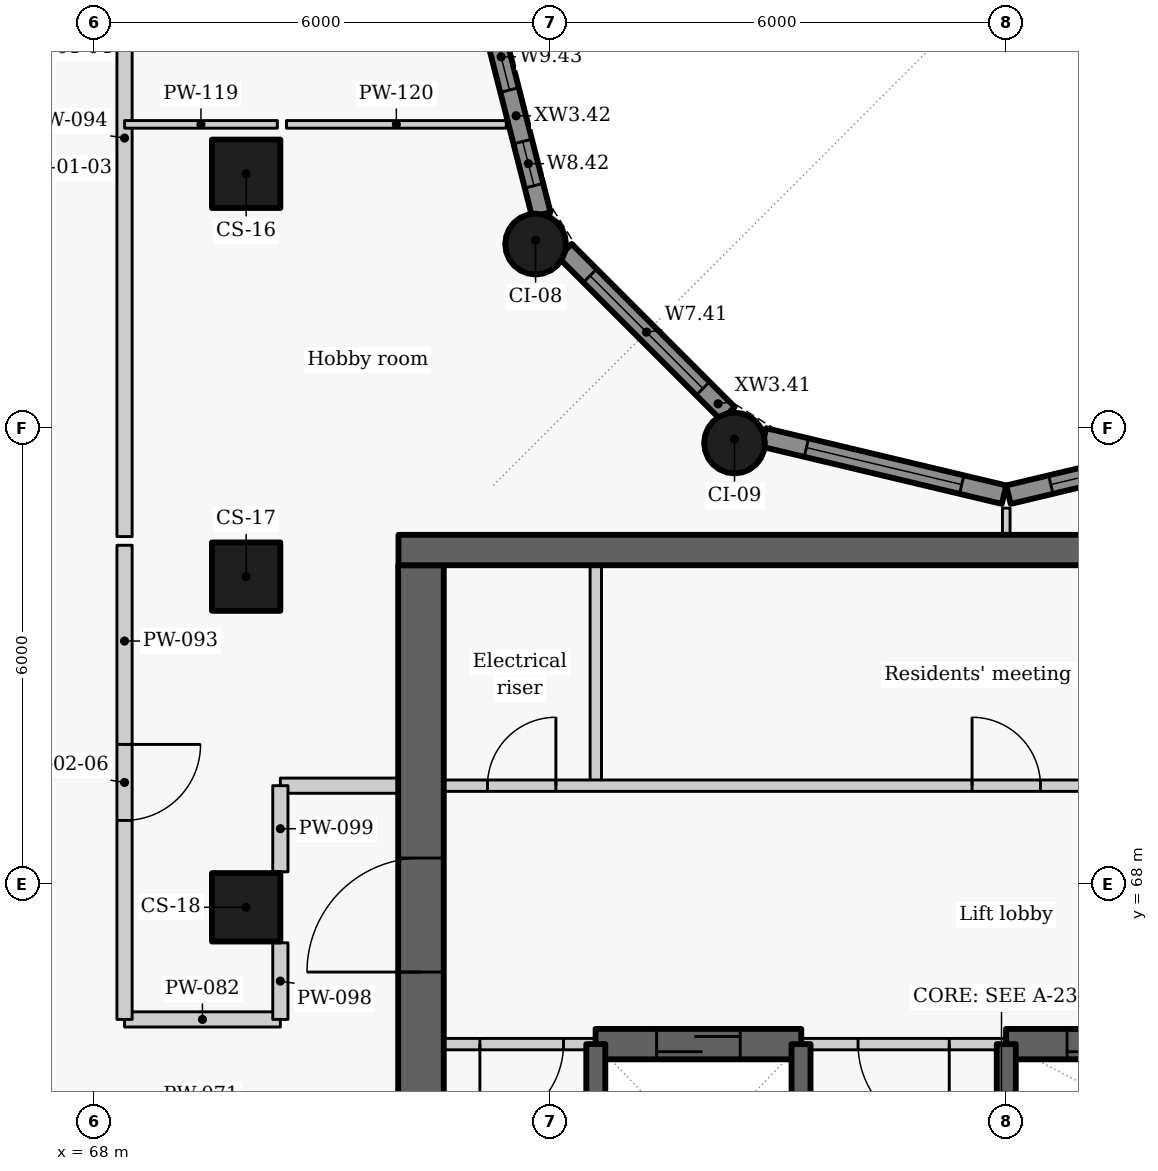
"""IFC4 building model, lengths in metres.
Left out: names, types, materials, properties, quantities, classifications, styles, units other than length and angle.
Written with IfcOpenShell. Run it as: python <this file> out.ifc"""

import sys

from ifc_helpers import new_model, si_unit, direction, frame, frame_2d, origin, origin_2d, place, context, subcontext, project, spatial, rectangle, circle, extrude, element, fill, save


model = new_model("IFC4")
c1 = context("Model", 3, precision=1e-05, world=origin(), true_north=direction((0.0, 1.0)))
c2 = subcontext(c1, "Body", "Model", "MODEL_VIEW")
j1 = project(units=[si_unit("LENGTHUNIT", "METRE"), si_unit("PLANEANGLEUNIT", "RADIAN")], contexts=[c1])
p1 = place(None, origin())
s1 = spatial("IfcSite", under=j1, at=p1, CompositionType="ELEMENT")
p2 = place(p1, origin())
s2 = spatial("IfcBuilding", under=s1, at=p2, CompositionType="ELEMENT")
p3 = place(p2, frame((0.0, 0.0, 213.0)))
s3 = spatial("IfcBuildingStorey", under=s2, at=p3, CompositionType="ELEMENT", Elevation=213.0)
for number, where, z_axis, x_axis in (
    (1, (70.0, 77.35, 0.0), (0.0, 0.0, 1.0), (0.0, -1.0, 0.0)),
    (2, (70.0, 72.05, 0.0), (0.0, 0.0, 1.0), (0.0, -1.0, 0.0)),
    (3, (70.0, 67.7, 0.0), (0.0, 0.0, 1.0), (0.0, -1.0, 0.0)),
):
    element("IfcColumn", number, at=place(p3, frame(where, z_axis=z_axis, x_axis=x_axis)), inside=s3, PredefinedType="COLUMN", context=c2, shape_type="SweptSolid", body=[
        extrude(rectangle(XDim=0.9, YDim=0.9, at=origin_2d()), origin(), (0.0, 0.0, 1.0), 3.3),
    ])
for number, where, z_axis, x_axis in (
    (4, (73.808, 76.425, 0.0), (0.0, 0.0, 1.0), (0.5, -0.866, 0.0)),
    (5, (76.425, 73.808, 0.0), (0.0, 0.0, 1.0), (0.866, -0.5, 0.0)),
):
    element("IfcColumn", number, at=place(p3, frame(where, z_axis=z_axis, x_axis=x_axis)), inside=s3, PredefinedType="COLUMN", context=c2, shape_type="SweptSolid", body=[
        extrude(circle(Radius=0.4, at=origin_2d()), origin(), (0.0, 0.0, 1.0), 3.3),
    ])
p4 = place(p3, frame((83.186, 73.881, 0.0), z_axis=(0.0, 0.0, 1.0), x_axis=(-0.972773113459, -0.231759508395, 0.0)))
e6 = element("IfcWall", 6, at=p4, inside=s3, PredefinedType="SOLIDWALL", context=c2, shape_type="SweptSolid", body=[
    extrude(rectangle(XDim=3.246, YDim=0.25, at=frame_2d((1.623, 0.0))), origin(), (0.0, 0.0, 1.0), 2.425),
])
p5 = place(p4, frame((0.573, 0.0, 0.9)))
e7 = element("IfcOpeningElement", 7, at=p5, cuts=e6, PredefinedType="OPENING", context=c2, shape_type="SweptSolid", body=[
    extrude(rectangle(XDim=2.1, YDim=1.1, at=frame_2d((1.05, 0.55))), frame((0.0, 0.135, 0.0), z_axis=(0.0, -1.0, 0.0), x_axis=(1.0, 0.0, 0.0)), (0.0, 0.0, 1.0), 0.27),
])
p6 = place(p3, frame((79.971, 73.128, 0.0), z_axis=(0.0, 0.0, 1.0), x_axis=(-0.972773113459, 0.231759508395, 0.0)))
e8 = element("IfcWall", 8, at=p6, inside=s3, PredefinedType="SOLIDWALL", context=c2, shape_type="SweptSolid", body=[
    extrude(rectangle(XDim=3.246, YDim=0.25, at=frame_2d((1.623, 0.0))), origin(), (0.0, 0.0, 1.0), 2.425),
])
p7 = place(p6, frame((0.573, 0.0, 0.9)))
e9 = element("IfcOpeningElement", 9, at=p7, cuts=e8, PredefinedType="OPENING", context=c2, shape_type="SweptSolid", body=[
    extrude(rectangle(XDim=2.1, YDim=1.1, at=frame_2d((1.05, 0.55))), frame((0.0, 0.135, 0.0), z_axis=(0.0, -1.0, 0.0), x_axis=(1.0, 0.0, 0.0)), (0.0, 0.0, 1.0), 0.27),
])
p8 = place(p3, frame((76.339, 74.194, 0.0), z_axis=(0.0, 0.0, 1.0), x_axis=(-0.707106781187, 0.707106781187, 0.0)))
e10 = element("IfcWall", 10, at=p8, inside=s3, PredefinedType="SOLIDWALL", context=c2, shape_type="SweptSolid", body=[
    extrude(rectangle(XDim=3.033, YDim=0.25, at=frame_2d((1.517, 0.0))), origin(), (0.0, 0.0, 1.0), 2.425),
])
p9 = place(p8, frame((0.467, 0.0, 0.9)))
e11 = element("IfcOpeningElement", 11, at=p9, cuts=e10, PredefinedType="OPENING", context=c2, shape_type="SweptSolid", body=[
    extrude(rectangle(XDim=2.1, YDim=1.1, at=frame_2d((1.05, 0.55))), frame((0.0, 0.135, 0.0), z_axis=(0.0, -1.0, 0.0), x_axis=(1.0, 0.0, 0.0)), (0.0, 0.0, 1.0), 0.27),
])
p10 = place(p3, frame((73.883, 76.813, 0.0), z_axis=(0.0, 0.0, 1.0), x_axis=(-0.247055971283, 0.969001211069, 0.0)))
e12 = element("IfcWall", 12, at=p10, inside=s3, PredefinedType="SOLIDWALL", context=c2, shape_type="SweptSolid", body=[
    extrude(rectangle(XDim=3.01, YDim=0.25, at=frame_2d((1.505, 0.0))), origin(), (0.0, 0.0, 1.0), 2.425),
])
p11 = place(p10, frame((0.392, 0.0, 0.9)))
e13 = element("IfcOpeningElement", 13, at=p11, cuts=e12, PredefinedType="OPENING", context=c2, shape_type="SweptSolid", body=[
    extrude(rectangle(XDim=0.6, YDim=1.1, at=frame_2d((0.3, 0.55))), frame((0.0, 0.135, 0.0), z_axis=(0.0, -1.0, 0.0), x_axis=(1.0, 0.0, 0.0)), (0.0, 0.0, 1.0), 0.27),
])
p12 = place(p10, frame((1.691, 0.0, 0.9)))
e14 = element("IfcOpeningElement", 14, at=p12, cuts=e12, PredefinedType="OPENING", context=c2, shape_type="SweptSolid", body=[
    extrude(rectangle(XDim=0.9, YDim=1.1, at=frame_2d((0.45, 0.55))), frame((0.0, 0.135, 0.0), z_axis=(0.0, -1.0, 0.0), x_axis=(1.0, 0.0, 0.0)), (0.0, 0.0, 1.0), 0.27),
])
p13 = place(p3, frame((74.6, 69.3, 0.0), z_axis=(0.0, 0.0, 1.0), x_axis=(0.0, 1.0, 0.0)))
e15 = element("IfcWall", 15, at=p13, inside=s3, PredefinedType="PARTITIONING", context=c2, shape_type="SweptSolid", body=[
    extrude(rectangle(XDim=2.9, YDim=0.15, at=frame_2d((1.45, 0.0))), origin(), (0.0, 0.0, 1.0), 3.025),
])
p14 = place(p3, frame((72.0, 69.3, 0.0), z_axis=(0.0, 0.0, 1.0), x_axis=(1.0, 0.0, 0.0)))
e16 = element("IfcWall", 16, at=p14, inside=s3, PredefinedType="PARTITIONING", context=c2, shape_type="SweptSolid", body=[
    extrude(rectangle(XDim=13.4, YDim=0.15, at=frame_2d((6.7, 0.0))), origin(), (0.0, 0.0, 1.0), 3.025),
])
p15 = place(p14, frame((1.175, 0.0, 0.0)))
e17 = element("IfcOpeningElement", 17, at=p15, cuts=e16, PredefinedType="OPENING", context=c2, shape_type="SweptSolid", body=[
    extrude(rectangle(XDim=0.9, YDim=2.1, at=frame_2d((0.45, 1.05))), frame((0.0, 0.085, 0.0), z_axis=(0.0, -1.0, 0.0), x_axis=(1.0, 0.0, 0.0)), (0.0, 0.0, 1.0), 0.17),
])
p16 = place(p14, frame((7.55, 0.0, 0.0)))
e18 = element("IfcOpeningElement", 18, at=p16, cuts=e16, PredefinedType="OPENING", context=c2, shape_type="SweptSolid", body=[
    extrude(rectangle(XDim=0.9, YDim=2.1, at=frame_2d((0.45, 1.05))), frame((0.0, 0.085, 0.0), z_axis=(0.0, -1.0, 0.0), x_axis=(1.0, 0.0, 0.0)), (0.0, 0.0, 1.0), 0.17),
])
p17 = place(p3, frame((72.3, 63.1, -0.275), z_axis=(0.0, 0.0, 1.0), x_axis=(0.0, 1.0, 0.0)))
e19 = element("IfcWall", 19, at=p17, inside=s3, PredefinedType="SHEAR", context=c2, shape_type="SweptSolid", body=[
    extrude(rectangle(XDim=9.1, YDim=0.6, at=frame_2d((4.55, 0.0))), origin(), (0.0, 0.0, 1.0), 3.3),
])
p18 = place(p17, frame((3.748, 0.0, 0.275)))
e20 = element("IfcOpeningElement", 20, at=p18, cuts=e19, PredefinedType="OPENING", context=c2, shape_type="SweptSolid", body=[
    extrude(rectangle(XDim=1.5, YDim=2.1, at=frame_2d((0.75, 1.05))), frame((0.0, 0.31, 0.0), z_axis=(0.0, -1.0, 0.0), x_axis=(1.0, 0.0, 0.0)), (0.0, 0.0, 1.0), 0.62),
])
p19 = place(p3, frame((74.603, 65.9, 0.0), z_axis=(0.0, 0.0, 1.0), x_axis=(-1.0, 0.0, 0.0)))
e21 = element("IfcWall", 21, at=p19, inside=s3, PredefinedType="PARTITIONING", context=c2, shape_type="SweptSolid", body=[
    extrude(rectangle(XDim=2.603, YDim=0.15, at=frame_2d((1.302, 0.0))), origin(), (0.0, 0.0, 1.0), 3.025),
])
p20 = place(p19, frame((0.428, 0.0, 0.0)))
e22 = element("IfcOpeningElement", 22, at=p20, cuts=e21, PredefinedType="OPENING", context=c2, shape_type="SweptSolid", body=[
    extrude(rectangle(XDim=1.1, YDim=2.1, at=frame_2d((0.55, 1.05))), frame((0.0, 0.085, 0.0), z_axis=(0.0, -1.0, 0.0), x_axis=(1.0, 0.0, 0.0)), (0.0, 0.0, 1.0), 0.17),
])
p21 = place(p3, frame((80.003, 65.9, 0.0), z_axis=(0.0, 0.0, 1.0), x_axis=(-1.0, 0.0, 0.0)))
e23 = element("IfcWall", 23, at=p21, inside=s3, PredefinedType="PARTITIONING", context=c2, shape_type="SweptSolid", body=[
    extrude(rectangle(XDim=2.706, YDim=0.15, at=frame_2d((1.353, 0.0))), origin(), (0.0, 0.0, 1.0), 3.025),
])
p22 = place(p21, frame((0.753, 0.0, 0.0)))
e24 = element("IfcOpeningElement", 24, at=p22, cuts=e23, PredefinedType="OPENING", context=c2, shape_type="SweptSolid", body=[
    extrude(rectangle(XDim=1.2, YDim=2.1, at=frame_2d((0.6, 1.05))), frame((0.0, 0.085, 0.0), z_axis=(0.0, -1.0, 0.0), x_axis=(1.0, 0.0, 0.0)), (0.0, 0.0, 1.0), 0.17),
])
p23 = place(p3, frame((74.597, 65.9, -0.275), z_axis=(0.0, 0.0, 1.0), x_axis=(1.0, 0.0, 0.0)))
e25 = element("IfcWall", 25, at=p23, inside=s3, PredefinedType="SHEAR", context=c2, shape_type="SweptSolid", body=[
    extrude(rectangle(XDim=2.706, YDim=0.4, at=frame_2d((1.353, 0.0))), origin(), (0.0, 0.0, 1.0), 3.3),
])
p24 = place(p23, frame((0.803, 0.0, 0.275)))
e26 = element("IfcOpeningElement", 26, at=p24, cuts=e25, PredefinedType="OPENING", context=c2, shape_type="SweptSolid", body=[
    extrude(rectangle(XDim=1.1, YDim=2.1, at=frame_2d((0.55, 1.05))), frame((0.0, 0.21, 0.0), z_axis=(0.0, -1.0, 0.0), x_axis=(1.0, 0.0, 0.0)), (0.0, 0.0, 1.0), 0.42),
])
p25 = place(p3, frame((79.997, 65.9, -0.275), z_axis=(0.0, 0.0, 1.0), x_axis=(1.0, 0.0, 0.0)))
e27 = element("IfcWall", 27, at=p25, inside=s3, PredefinedType="SHEAR", context=c2, shape_type="SweptSolid", body=[
    extrude(rectangle(XDim=5.406, YDim=0.4, at=frame_2d((2.703, 0.0))), origin(), (0.0, 0.0, 1.0), 3.3),
])
p26 = place(p25, frame((0.803, 0.0, 0.275)))
e28 = element("IfcOpeningElement", 28, at=p26, cuts=e27, PredefinedType="OPENING", context=c2, shape_type="SweptSolid", body=[
    extrude(rectangle(XDim=1.1, YDim=2.1, at=frame_2d((0.55, 1.05))), frame((0.0, 0.21, 0.0), z_axis=(0.0, -1.0, 0.0), x_axis=(1.0, 0.0, 0.0)), (0.0, 0.0, 1.0), 0.42),
])
for number, where, z_axis, x_axis in (
    (29, (74.6, 63.1, -0.275), (0.0, 0.0, 1.0), (0.0, 1.0, 0.0)),
    (30, (77.3, 63.1, -0.275), (0.0, 0.0, 1.0), (0.0, 1.0, 0.0)),
    (31, (80.0, 63.1, -0.275), (0.0, 0.0, 1.0), (0.0, 1.0, 0.0)),
):
    element("IfcWall", number, at=place(p3, frame(where, z_axis=z_axis, x_axis=x_axis)), inside=s3, PredefinedType="SHEAR", context=c2, shape_type="SweptSolid", body=[
        extrude(rectangle(XDim=2.8, YDim=0.25, at=frame_2d((1.4, 0.0))), origin(), (0.0, 0.0, 1.0), 3.3),
    ])
p27 = place(p3, frame((70.45, 69.3, 0.0), z_axis=(0.0, 0.0, 1.0), x_axis=(1.0, 0.0, 0.0)))
e32 = element("IfcWall", 32, at=p27, inside=s3, PredefinedType="PARTITIONING", context=c2, shape_type="SweptSolid", body=[
    extrude(rectangle(XDim=1.55, YDim=0.2, at=frame_2d((0.775, 0.0))), origin(), (0.0, 0.0, 1.0), 3.025),
])
p28 = place(p3, frame((68.4, 66.225, 0.0), z_axis=(0.0, 0.0, 1.0), x_axis=(1.0, 0.0, 0.0)))
e33 = element("IfcWall", 33, at=p28, inside=s3, PredefinedType="PARTITIONING", context=c2, shape_type="SweptSolid", body=[
    extrude(rectangle(XDim=2.05, YDim=0.2, at=frame_2d((1.025, 0.0))), origin(), (0.0, 0.0, 1.0), 2.505),
])
p29 = place(p3, frame((68.4, 72.463, 0.0), z_axis=(0.0, 0.0, 1.0), x_axis=(0.0, -1.0, 0.0)))
e34 = element("IfcWall", 34, at=p29, inside=s3, PredefinedType="PARTITIONING", context=c2, shape_type="SweptSolid", body=[
    extrude(rectangle(XDim=6.238, YDim=0.2, at=frame_2d((3.119, 0.0))), origin(), (0.0, 0.0, 1.0), 3.025),
])
p30 = place(p29, frame((2.62, 0.0, 0.0)))
e35 = element("IfcOpeningElement", 35, at=p30, cuts=e34, PredefinedType="OPENING", context=c2, shape_type="SweptSolid", body=[
    extrude(rectangle(XDim=1.0, YDim=2.1, at=frame_2d((0.5, 1.05))), frame((0.0, 0.11, 0.0), z_axis=(0.0, -1.0, 0.0), x_axis=(1.0, 0.0, 0.0)), (0.0, 0.0, 1.0), 0.22),
])
p31 = place(p3, frame((68.4, 72.577, 0.0), z_axis=(0.0, 0.0, 1.0), x_axis=(0.0, 1.0, 0.0)))
e36 = element("IfcWall", 36, at=p31, inside=s3, PredefinedType="PARTITIONING", context=c2, shape_type="SweptSolid", body=[
    extrude(rectangle(XDim=10.486, YDim=0.2, at=frame_2d((5.243, 0.0))), origin(), (0.0, 0.0, 1.0), 3.025),
])
p32 = place(p3, frame((70.45, 66.225, 0.0), z_axis=(0.0, 0.0, 1.0), x_axis=(0.0, 1.0, 0.0)))
e37 = element("IfcWall", 37, at=p32, inside=s3, PredefinedType="PARTITIONING", context=c2, shape_type="SweptSolid", body=[
    extrude(rectangle(XDim=1.008, YDim=0.2, at=frame_2d((0.504, 0.0))), origin(), (0.0, 0.0, 1.0), 3.025),
])
p33 = place(p3, frame((70.45, 68.167, 0.0), z_axis=(0.0, 0.0, 1.0), x_axis=(0.0, 1.0, 0.0)))
e38 = element("IfcWall", 38, at=p33, inside=s3, PredefinedType="PARTITIONING", context=c2, shape_type="SweptSolid", body=[
    extrude(rectangle(XDim=1.133, YDim=0.2, at=frame_2d((0.566, 0.0))), origin(), (0.0, 0.0, 1.0), 3.025),
])
p34 = place(p3, frame((80.0, 72.6, 0.0), z_axis=(0.0, 0.0, 1.0), x_axis=(0.0, 1.0, 0.0)))
e39 = element("IfcWall", 39, at=p34, inside=s3, PredefinedType="PARTITIONING", context=c2, shape_type="SweptSolid", body=[
    extrude(rectangle(XDim=0.352, YDim=0.1, at=frame_2d((0.176, 0.0))), origin(), (0.0, 0.0, 1.0), 3.025),
])
p35 = place(p3, frame((68.401, 78.0, 0.0), z_axis=(0.0, 0.0, 1.0), x_axis=(1.0, 0.0, 0.0)))
e40 = element("IfcWall", 40, at=p35, inside=s3, PredefinedType="PARTITIONING", context=c2, shape_type="SweptSolid", body=[
    extrude(rectangle(XDim=2.009, YDim=0.1, at=frame_2d((1.004, 0.0))), origin(), (0.0, 0.0, 1.0), 2.505),
])
p36 = place(p3, frame((70.53, 78.0, 0.0), z_axis=(0.0, 0.0, 1.0), x_axis=(1.0, 0.0, 0.0)))
e41 = element("IfcWall", 41, at=p36, inside=s3, PredefinedType="PARTITIONING", context=c2, shape_type="SweptSolid", body=[
    extrude(rectangle(XDim=2.892, YDim=0.1, at=frame_2d((1.446, 0.0))), origin(), (0.0, 0.0, 1.0), 3.025),
])
p37 = place(p3, frame((72.004, 72.4, -0.275), z_axis=(0.0, 0.0, 1.0), x_axis=(1.0, 0.0, 0.0)))
e42 = element("IfcWall", 42, at=p37, inside=s3, PredefinedType="SHEAR", context=c2, shape_type="SweptSolid", body=[
    extrude(rectangle(XDim=15.992, YDim=0.4, at=frame_2d((7.996, 0.0))), origin(), (0.0, 0.0, 1.0), 3.3),
])
p38 = place(p5, origin())
e43 = element("IfcWindow", 43, at=p38, inside=s3, PartitioningType="SINGLE_PANEL", PredefinedType="WINDOW", context=c2, shape_type="SweptSolid", body=[
    extrude(rectangle(XDim=2.1, YDim=1.1, at=frame_2d((1.05, 0.55))), frame((0.0, 0.03, 0.0), z_axis=(0.0, -1.0, 0.0), x_axis=(1.0, 0.0, 0.0)), (0.0, 0.0, 1.0), 0.06),
])
fill(e7, e43)
p39 = place(p7, origin())
e44 = element("IfcWindow", 44, at=p39, inside=s3, PartitioningType="SINGLE_PANEL", PredefinedType="WINDOW", context=c2, shape_type="SweptSolid", body=[
    extrude(rectangle(XDim=2.1, YDim=1.1, at=frame_2d((1.05, 0.55))), frame((0.0, 0.03, 0.0), z_axis=(0.0, -1.0, 0.0), x_axis=(1.0, 0.0, 0.0)), (0.0, 0.0, 1.0), 0.06),
])
fill(e9, e44)
p40 = place(p9, origin())
e45 = element("IfcWindow", 45, at=p40, inside=s3, PartitioningType="SINGLE_PANEL", PredefinedType="WINDOW", context=c2, shape_type="SweptSolid", body=[
    extrude(rectangle(XDim=2.1, YDim=1.1, at=frame_2d((1.05, 0.55))), frame((0.0, 0.03, 0.0), z_axis=(0.0, -1.0, 0.0), x_axis=(1.0, 0.0, 0.0)), (0.0, 0.0, 1.0), 0.06),
])
fill(e11, e45)
p41 = place(p11, origin())
e46 = element("IfcWindow", 46, at=p41, inside=s3, PartitioningType="SINGLE_PANEL", PredefinedType="WINDOW", context=c2, shape_type="SweptSolid", body=[
    extrude(rectangle(XDim=0.6, YDim=1.1, at=frame_2d((0.3, 0.55))), frame((0.0, 0.03, 0.0), z_axis=(0.0, -1.0, 0.0), x_axis=(1.0, 0.0, 0.0)), (0.0, 0.0, 1.0), 0.06),
])
fill(e13, e46)
p42 = place(p12, origin())
e47 = element("IfcWindow", 47, at=p42, inside=s3, PartitioningType="SINGLE_PANEL", PredefinedType="WINDOW", context=c2, shape_type="SweptSolid", body=[
    extrude(rectangle(XDim=0.9, YDim=1.1, at=frame_2d((0.45, 0.55))), frame((0.0, 0.03, 0.0), z_axis=(0.0, -1.0, 0.0), x_axis=(1.0, 0.0, 0.0)), (0.0, 0.0, 1.0), 0.06),
])
fill(e14, e47)
p43 = place(p15, origin())
e48 = element("IfcDoor", 48, at=p43, inside=s3, OperationType="SINGLE_SWING_RIGHT", PredefinedType="DOOR", context=c2, shape_type="SweptSolid", body=[
    extrude(rectangle(XDim=0.9, YDim=2.1, at=frame_2d((0.45, 1.05))), frame((0.0, 0.025, 0.0), z_axis=(0.0, -1.0, 0.0), x_axis=(1.0, 0.0, 0.0)), (0.0, 0.0, 1.0), 0.05),
])
fill(e17, e48)
p44 = place(p16, origin())
e49 = element("IfcDoor", 49, at=p44, inside=s3, OperationType="SINGLE_SWING_LEFT", PredefinedType="DOOR", context=c2, shape_type="SweptSolid", body=[
    extrude(rectangle(XDim=0.9, YDim=2.1, at=frame_2d((0.45, 1.05))), frame((0.0, 0.025, 0.0), z_axis=(0.0, -1.0, 0.0), x_axis=(1.0, 0.0, 0.0)), (0.0, 0.0, 1.0), 0.05),
])
fill(e18, e49)
p45 = place(p20, origin())
e50 = element("IfcDoor", 50, at=p45, inside=s3, OperationType="SINGLE_SWING_RIGHT", PredefinedType="DOOR", context=c2, shape_type="SweptSolid", body=[
    extrude(rectangle(XDim=1.1, YDim=2.1, at=frame_2d((0.55, 1.05))), frame((0.0, 0.025, 0.0), z_axis=(0.0, -1.0, 0.0), x_axis=(1.0, 0.0, 0.0)), (0.0, 0.0, 1.0), 0.05),
])
fill(e22, e50)
p46 = place(p24, origin())
e51 = element("IfcDoor", 51, at=p46, inside=s3, OperationType="SLIDING_TO_LEFT", PredefinedType="DOOR", context=c2, shape_type="SweptSolid", body=[
    extrude(rectangle(XDim=1.1, YDim=2.1, at=frame_2d((0.55, 1.05))), frame((0.0, 0.025, 0.0), z_axis=(0.0, -1.0, 0.0), x_axis=(1.0, 0.0, 0.0)), (0.0, 0.0, 1.0), 0.05),
])
fill(e26, e51)
p47 = place(p22, origin())
e52 = element("IfcDoor", 52, at=p47, inside=s3, OperationType="DOUBLE_DOOR_SINGLE_SWING", PredefinedType="DOOR", context=c2, shape_type="SweptSolid", body=[
    extrude(rectangle(XDim=1.2, YDim=2.1, at=frame_2d((0.6, 1.05))), frame((0.0, 0.025, 0.0), z_axis=(0.0, -1.0, 0.0), x_axis=(1.0, 0.0, 0.0)), (0.0, 0.0, 1.0), 0.05),
])
fill(e24, e52)
p48 = place(p26, origin())
e53 = element("IfcDoor", 53, at=p48, inside=s3, OperationType="SLIDING_TO_LEFT", PredefinedType="DOOR", context=c2, shape_type="SweptSolid", body=[
    extrude(rectangle(XDim=1.1, YDim=2.1, at=frame_2d((0.55, 1.05))), frame((0.0, 0.025, 0.0), z_axis=(0.0, -1.0, 0.0), x_axis=(1.0, 0.0, 0.0)), (0.0, 0.0, 1.0), 0.05),
])
fill(e28, e53)
p49 = place(p30, origin())
e54 = element("IfcDoor", 54, at=p49, inside=s3, OperationType="SINGLE_SWING_LEFT", PredefinedType="DOOR", context=c2, shape_type="SweptSolid", body=[
    extrude(rectangle(XDim=1.0, YDim=2.1, at=frame_2d((0.5, 1.05))), frame((0.0, 0.025, 0.0), z_axis=(0.0, -1.0, 0.0), x_axis=(1.0, 0.0, 0.0)), (0.0, 0.0, 1.0), 0.05),
])
fill(e35, e54)
p50 = place(p18, origin())
e55 = element("IfcDoor", 55, at=p50, inside=s3, OperationType="DOUBLE_DOOR_SINGLE_SWING", PredefinedType="DOOR", context=c2, shape_type="SweptSolid", body=[
    extrude(rectangle(XDim=1.5, YDim=2.1, at=frame_2d((0.75, 1.05))), frame((0.0, 0.025, 0.0), z_axis=(0.0, -1.0, 0.0), x_axis=(1.0, 0.0, 0.0)), (0.0, 0.0, 1.0), 0.05),
])
fill(e20, e55)
save(model, sys.argv[1])
